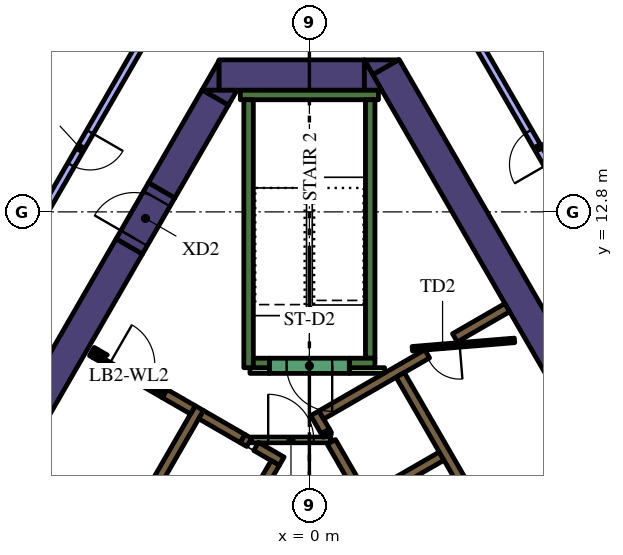
"""IFC4 building model, lengths in metres.
Left out: names, types, materials, properties, quantities, classifications, styles, units other than length and angle.
Written with IfcOpenShell. Run it as: python <this file> out.ifc"""

import sys

from ifc_helpers import new_model, si_unit, direction, frame, frame_2d, origin, place, context, subcontext, project, spatial, polyline, rectangle, outline, extrude, element, fill, save


model = new_model("IFC4")
c1 = context("Model", 3, precision=1e-05, world=origin(), true_north=direction((0.0, 1.0)))
c2 = subcontext(c1, "Body", "Model", "MODEL_VIEW")
j1 = project(units=[si_unit("LENGTHUNIT", "METRE"), si_unit("PLANEANGLEUNIT", "RADIAN")], contexts=[c1])
p1 = place(None, origin())
s1 = spatial("IfcSite", under=j1, at=p1, CompositionType="ELEMENT")
p2 = place(p1, origin())
s2 = spatial("IfcBuilding", under=s1, at=p2, CompositionType="ELEMENT")
p3 = place(p2, frame((0.0, 0.0, 162.6)))
s3 = spatial("IfcBuildingStorey", under=s2, at=p3, CompositionType="ELEMENT", Elevation=162.6)
p4 = place(p3, frame((8.279, 5.761, 0.0), z_axis=(0.0, 0.0, 1.0), x_axis=(-0.500010359015, 0.866019422922, 0.0)))
e1 = element("IfcWall", 1, at=p4, inside=s3, PredefinedType="SOLIDWALL", context=c2, shape_type="SweptSolid", body=[
    extrude(rectangle(XDim=12.528, YDim=0.8, at=frame_2d((6.264, 0.0))), origin(), (0.0, 0.0, 1.0), 4.2),
])
p5 = place(p3, origin())
e2 = element("IfcWall", 2, at=p5, inside=s3, PredefinedType="SOLIDWALL", context=c2, shape_type="SweptSolid", body=[
    extrude(outline(polyline([(1.443, 16.8), (2.339, 16.8), (1.667, 16.412), (1.443, 16.8)])), origin(), (0.0, 0.0, 1.0), 4.2),
])
p6 = place(p3, frame((-2.379, 16.4, 0.0), z_axis=(0.0, 0.0, 1.0), x_axis=(1.0, 0.0, 0.0)))
e3 = element("IfcWall", 3, at=p6, inside=s3, PredefinedType="SOLIDWALL", context=c2, shape_type="SweptSolid", body=[
    extrude(rectangle(XDim=3.824, YDim=0.8, at=frame_2d((1.912, 0.0))), origin(), (0.0, 0.0, 1.0), 4.2),
])
e4 = element("IfcWall", 4, at=p5, inside=s3, PredefinedType="SOLIDWALL", context=c2, shape_type="SweptSolid", body=[
    extrude(outline(polyline([(1.905, 16.0), (1.447, 16.0), (1.447, 16.793), (1.905, 16.0)])), origin(), (0.0, 0.0, 1.0), 4.2),
])
e5 = element("IfcWall", 5, at=p5, inside=s3, PredefinedType="SOLIDWALL", context=c2, shape_type="SweptSolid", body=[
    extrude(outline(polyline([(-2.829, 16.0), (-2.381, 16.776), (-2.381, 16.0), (-2.829, 16.0)])), origin(), (0.0, 0.0, 1.0), 4.2),
])
p7 = place(p3, frame((-2.477, 15.81, 0.0), z_axis=(0.0, 0.0, 1.0), x_axis=(-0.499969377405, -0.866043083026, 0.0)))
e6 = element("IfcWall", 6, at=p7, inside=s3, PredefinedType="SOLIDWALL", context=c2, shape_type="SweptSolid", body=[
    extrude(rectangle(XDim=2.824, YDim=0.8, at=frame_2d((1.412, 0.0))), origin(), (0.0, 0.0, 1.0), 4.2),
])
e7 = element("IfcWall", 7, at=p5, inside=s3, PredefinedType="SOLIDWALL", context=c2, shape_type="SweptSolid", body=[
    extrude(outline(polyline([(-1.905, 16.0), (-2.129, 15.612), (-2.801, 16.0), (-1.905, 16.0)])), origin(), (0.0, 0.0, 1.0), 4.2),
])
p8 = place(p3, frame((-12.668, -1.842, 0.0), z_axis=(0.0, 0.0, 1.0), x_axis=(0.500003640647, 0.866023301845, 0.0)))
e8 = element("IfcWall", 8, at=p8, inside=s3, PredefinedType="SOLIDWALL", context=c2, shape_type="SweptSolid", body=[
    extrude(rectangle(XDim=15.858, YDim=0.8, at=frame_2d((7.929, 0.0))), origin(), (0.0, 0.0, 1.0), 4.2),
])
p9 = place(p3, frame((-1.817, 15.875, 0.0), z_axis=(0.0, 0.0, 1.0), x_axis=(1.0, 0.0, 0.0)))
e9 = element("IfcWall", 9, at=p9, inside=s3, PredefinedType="SOLIDWALL", context=c2, shape_type="SweptSolid", body=[
    extrude(rectangle(XDim=3.634, YDim=0.25, at=frame_2d((1.817, 0.0))), origin(), (0.0, 0.0, 1.0), 4.2),
])
p10 = place(p3, frame((1.6, 8.95, 0.0), z_axis=(0.0, 0.0, 1.0), x_axis=(0.0, 1.0, 0.0)))
e10 = element("IfcWall", 10, at=p10, inside=s3, PredefinedType="SOLIDWALL", context=c2, shape_type="SweptSolid", body=[
    extrude(rectangle(XDim=6.8, YDim=0.25, at=frame_2d((3.4, 0.0))), origin(), (0.0, 0.0, 1.0), 4.2),
])
p11 = place(p3, frame((1.05, 8.825, 0.0), z_axis=(0.0, 0.0, 1.0), x_axis=(1.0, 0.0, 0.0)))
e11 = element("IfcWall", 11, at=p11, inside=s3, PredefinedType="SOLIDWALL", context=c2, shape_type="SweptSolid", body=[
    extrude(rectangle(XDim=0.675, YDim=0.25, at=frame_2d((0.337, 0.0))), origin(), (0.0, 0.0, 1.0), 4.2),
])
p12 = place(p3, frame((-1.6, 8.7, 0.0), z_axis=(0.0, 0.0, 1.0), x_axis=(0.0, 1.0, 0.0)))
e12 = element("IfcWall", 12, at=p12, inside=s3, PredefinedType="SOLIDWALL", context=c2, shape_type="SweptSolid", body=[
    extrude(rectangle(XDim=7.05, YDim=0.25, at=frame_2d((3.525, 0.0))), origin(), (0.0, 0.0, 1.0), 4.2),
])
p13 = place(p3, frame((-1.475, 8.825, 0.0), z_axis=(0.0, 0.0, 1.0), x_axis=(1.0, 0.0, 0.0)))
e13 = element("IfcWall", 13, at=p13, inside=s3, PredefinedType="SOLIDWALL", context=c2, shape_type="SweptSolid", body=[
    extrude(rectangle(XDim=0.425, YDim=0.25, at=frame_2d((0.212, 0.0))), origin(), (0.0, 0.0, 1.0), 4.2),
])
p14 = place(p3, frame((0.473, 6.93, 0.0), z_axis=(0.0, 0.0, 1.0), x_axis=(-0.49972245349, 0.866185586049, 0.0)))
e14 = element("IfcWall", 14, at=p14, inside=s3, PredefinedType="SOLIDWALL", context=c2, shape_type="SweptSolid", body=[
    extrude(rectangle(XDim=0.11, YDim=0.25, at=frame_2d((0.055, 0.0))), origin(), (0.0, 0.0, 1.0), 4.2),
])
p15 = place(p3, frame((6.568, -3.627, 0.0), z_axis=(0.0, 0.0, 1.0), x_axis=(-0.499999455981, 0.866025717874, 0.0)))
e15 = element("IfcWall", 15, at=p15, inside=s3, PredefinedType="SOLIDWALL", context=c2, shape_type="SweptSolid", body=[
    extrude(rectangle(XDim=11.978, YDim=0.25, at=frame_2d((5.989, 0.0))), origin(), (0.0, 0.0, 1.0), 4.2),
])
p16 = place(p3, frame((0.417, 7.027, 0.0), z_axis=(0.0, 0.0, 1.0), x_axis=(-0.500210807569, 0.865903659763, 0.0)))
e16 = element("IfcWall", 16, at=p16, inside=s3, PredefinedType="SOLIDWALL", context=c2, shape_type="SweptSolid", body=[
    extrude(rectangle(XDim=0.548, YDim=0.25, at=frame_2d((0.274, 0.0))), origin(), (0.0, 0.0, 1.0), 4.2),
])
p17 = place(p3, frame((3.1, 9.064, 0.0), z_axis=(0.0, 0.0, 1.0), x_axis=(-0.866030133475, -0.499991807846, 0.0)))
e17 = element("IfcWall", 17, at=p17, inside=s3, PredefinedType="SOLIDWALL", context=c2, shape_type="SweptSolid", body=[
    extrude(rectangle(XDim=3.217, YDim=0.25, at=frame_2d((1.608, 0.0))), origin(), (0.0, 0.0, 1.0), 4.2),
])
p18 = place(p3, frame((1.574, 5.274, 0.0), z_axis=(0.0, 0.0, 1.0), x_axis=(0.866028486751, 0.499994660107, 0.0)))
e18 = element("IfcWall", 18, at=p18, inside=s3, PredefinedType="SOLIDWALL", context=c2, shape_type="SweptSolid", body=[
    extrude(rectangle(XDim=2.2, YDim=0.25, at=frame_2d((1.1, 0.0))), origin(), (0.0, 0.0, 1.0), 4.2),
])
p19 = place(p3, frame((3.83, 9.486, 0.0), z_axis=(0.0, 0.0, 1.0), x_axis=(0.865986202621, 0.500067892261, 0.0)))
e19 = element("IfcWall", 19, at=p19, inside=s3, PredefinedType="SOLIDWALL", context=c2, shape_type="SweptSolid", body=[
    extrude(rectangle(XDim=1.591, YDim=0.25, at=frame_2d((0.795, 0.0))), origin(), (0.0, 0.0, 1.0), 4.2),
])
p20 = place(p3, frame((-8.06, -1.311, 0.0), z_axis=(0.0, 0.0, 1.0), x_axis=(0.50000273126, 0.866023826885, 0.0)))
e20 = element("IfcWall", 20, at=p20, inside=s3, PredefinedType="SOLIDWALL", context=c2, shape_type="SweptSolid", body=[
    extrude(rectangle(XDim=10.33, YDim=0.25, at=frame_2d((5.165, 0.0))), origin(), (0.0, 0.0, 1.0), 4.2),
])
p21 = place(p3, frame((-1.758, 6.835, 0.0), z_axis=(0.0, 0.0, 1.0), x_axis=(0.865982457891, -0.500074377092, 0.0)))
e21 = element("IfcWall", 21, at=p21, inside=s3, PredefinedType="SOLIDWALL", context=c2, shape_type="SweptSolid", body=[
    extrude(rectangle(XDim=0.2, YDim=0.25, at=frame_2d((0.1, 0.0))), origin(), (0.0, 0.0, 1.0), 4.2),
])
p22 = place(p3, frame((-1.76, 6.836, 0.0), z_axis=(0.0, 0.0, 1.0), x_axis=(-0.865952863304, 0.500125622755, 0.0)))
e22 = element("IfcWall", 22, at=p22, inside=s3, PredefinedType="SOLIDWALL", context=c2, shape_type="SweptSolid", body=[
    extrude(rectangle(XDim=1.258, YDim=0.25, at=frame_2d((0.629, 0.0))), origin(), (0.0, 0.0, 1.0), 4.2),
])
p23 = place(p3, frame((-0.728, 6.24, 0.0), z_axis=(0.0, 0.0, 1.0), x_axis=(-0.865955664968, 0.500120771724, 0.0)))
e23 = element("IfcWall", 23, at=p23, inside=s3, PredefinedType="SOLIDWALL", context=c2, shape_type="SweptSolid", body=[
    extrude(rectangle(XDim=0.778, YDim=0.25, at=frame_2d((0.389, 0.0))), origin(), (0.0, 0.0, 1.0), 4.2),
])
p24 = place(p3, frame((-5.725, 9.125, 0.0), z_axis=(0.0, 0.0, 1.0), x_axis=(0.866185586049, -0.49972245349, 0.0)))
e24 = element("IfcWall", 24, at=p24, inside=s3, PredefinedType="SOLIDWALL", context=c2, shape_type="SweptSolid", body=[
    extrude(rectangle(XDim=0.11, YDim=0.25, at=frame_2d((0.055, 0.0))), origin(), (0.0, 0.0, 1.0), 4.2),
])
p25 = place(p3, frame((-3.066, 7.59, 0.0), z_axis=(0.0, 0.0, 1.0), x_axis=(-0.866081358704, 0.49990307071, 0.0)))
e25 = element("IfcWall", 25, at=p25, inside=s3, PredefinedType="SOLIDWALL", context=c2, shape_type="SweptSolid", body=[
    extrude(rectangle(XDim=0.858, YDim=0.25, at=frame_2d((0.429, 0.0))), origin(), (0.0, 0.0, 1.0), 4.2),
])
e26 = element("IfcWall", 26, at=p5, inside=s3, PredefinedType="SOLIDWALL", context=c2, shape_type="SweptSolid", body=[
    extrude(outline(polyline([(-3.748, 8.128), (-3.813, 8.015), (-4.027, 8.139), (-4.017, 8.156), (-4.008, 8.173), (-4.0, 8.192), (-3.995, 8.21), (-3.991, 8.23), (-3.99, 8.25), (-3.99, 8.268), (-3.748, 8.128)])), origin(), (0.0, 0.0, 1.0), 4.2),
])
e27 = element("IfcWall", 27, at=p5, inside=s3, PredefinedType="SOLIDWALL", context=c2, shape_type="SweptSolid", body=[
    extrude(outline(polyline([(-5.689, 8.96), (-5.69, 8.961), (-5.565, 9.177), (-5.319, 9.035), (-5.335, 9.026), (-5.351, 9.015), (-5.366, 9.002), (-5.379, 8.988), (-5.392, 8.972), (-5.402, 8.956), (-5.412, 8.939), (-5.629, 9.064), (-5.629, 9.064), (-5.689, 8.96)])), origin(), (0.0, 0.0, 1.0), 4.2),
])
p26 = place(p3, frame((1.05, 8.625, 0.0), z_axis=(0.0, 0.0, 1.0), x_axis=(1.0, 0.0, 0.0)))
e28 = element("IfcWall", 28, at=p26, inside=s3, PredefinedType="PARTITIONING", context=c2, shape_type="SweptSolid", body=[
    extrude(rectangle(XDim=0.929, YDim=0.15, at=frame_2d((0.464, 0.0))), origin(), (0.0, 0.0, 1.0), 3.15),
])
p27 = place(p3, frame((-1.564, 8.625, 0.0), z_axis=(0.0, 0.0, 1.0), x_axis=(1.0, 0.0, 0.0)))
e29 = element("IfcWall", 29, at=p27, inside=s3, PredefinedType="PARTITIONING", context=c2, shape_type="SweptSolid", body=[
    extrude(rectangle(XDim=0.514, YDim=0.15, at=frame_2d((0.257, 0.0))), origin(), (0.0, 0.0, 1.0), 3.15),
])
p28 = place(p3, frame((8.565, -2.185, 0.0), z_axis=(0.0, 0.0, 1.0), x_axis=(-0.499997954832, 0.866026584559, 0.0)))
e30 = element("IfcWall", 30, at=p28, inside=s3, PredefinedType="SOLIDWALL", context=c2, shape_type="SweptSolid", body=[
    extrude(rectangle(XDim=12.35, YDim=0.25, at=frame_2d((6.175, 0.0))), origin(), (0.0, 0.0, 1.0), 4.2),
])
p29 = place(p28, frame((0.585, 0.0, 0.0)))
e31 = element("IfcOpeningElement", 31, at=p29, cuts=e30, PredefinedType="OPENING", context=c2, shape_type="SweptSolid", body=[
    extrude(rectangle(XDim=1.1, YDim=2.1, at=frame_2d((0.55, 1.05))), frame((0.0, 0.135, 0.0), z_axis=(0.0, -1.0, 0.0), x_axis=(1.0, 0.0, 0.0)), (0.0, 0.0, 1.0), 0.27),
])
p30 = place(p3, frame((-0.898, 6.194, 0.0), z_axis=(0.0, 0.0, 1.0), x_axis=(-0.499996202215, -0.866027596426, 0.0)))
e32 = element("IfcWall", 32, at=p30, inside=s3, PredefinedType="SOLIDWALL", context=c2, shape_type="SweptSolid", body=[
    extrude(rectangle(XDim=9.83, YDim=0.25, at=frame_2d((4.915, 0.0))), origin(), (0.0, 0.0, 1.0), 4.2),
])
p31 = place(p30, frame((0.585, 0.0, 0.0)))
e33 = element("IfcOpeningElement", 33, at=p31, cuts=e32, PredefinedType="OPENING", context=c2, shape_type="SweptSolid", body=[
    extrude(rectangle(XDim=1.1, YDim=2.1, at=frame_2d((0.55, 1.05))), frame((0.0, 0.135, 0.0), z_axis=(0.0, -1.0, 0.0), x_axis=(1.0, 0.0, 0.0)), (0.0, 0.0, 1.0), 0.27),
])
p32 = place(p30, frame((3.105, 0.0, 0.0)))
e34 = element("IfcOpeningElement", 34, at=p32, cuts=e32, PredefinedType="OPENING", context=c2, shape_type="SweptSolid", body=[
    extrude(rectangle(XDim=1.1, YDim=2.1, at=frame_2d((0.55, 1.05))), frame((0.0, 0.135, 0.0), z_axis=(0.0, -1.0, 0.0), x_axis=(1.0, 0.0, 0.0)), (0.0, 0.0, 1.0), 0.27),
])
p33 = place(p30, frame((5.625, 0.0, 0.0)))
e35 = element("IfcOpeningElement", 35, at=p33, cuts=e32, PredefinedType="OPENING", context=c2, shape_type="SweptSolid", body=[
    extrude(rectangle(XDim=1.1, YDim=2.1, at=frame_2d((0.55, 1.05))), frame((0.0, 0.135, 0.0), z_axis=(0.0, -1.0, 0.0), x_axis=(1.0, 0.0, 0.0)), (0.0, 0.0, 1.0), 0.27),
])
p34 = place(p30, frame((8.145, 0.0, 0.0)))
e36 = element("IfcOpeningElement", 36, at=p34, cuts=e32, PredefinedType="OPENING", context=c2, shape_type="SweptSolid", body=[
    extrude(rectangle(XDim=1.1, YDim=2.1, at=frame_2d((0.55, 1.05))), frame((0.0, 0.135, 0.0), z_axis=(0.0, -1.0, 0.0), x_axis=(1.0, 0.0, 0.0)), (0.0, 0.0, 1.0), 0.27),
])
p35 = place(p3, frame((1.05, 8.75, 0.0), z_axis=(0.0, 0.0, 1.0), x_axis=(-1.0, 0.0, 0.0)))
e37 = element("IfcWall", 37, at=p35, inside=s3, PredefinedType="SOLIDWALL", context=c2, shape_type="SweptSolid", body=[
    extrude(rectangle(XDim=2.1, YDim=0.4, at=frame_2d((1.05, 0.0))), origin(), (0.0, 0.0, 1.0), 4.2),
])
p36 = place(p35, frame((0.45, 0.0, 0.0)))
e38 = element("IfcOpeningElement", 38, at=p36, cuts=e37, PredefinedType="OPENING", context=c2, shape_type="SweptSolid", body=[
    extrude(rectangle(XDim=1.2, YDim=2.1, at=frame_2d((0.6, 1.05))), frame((0.0, 0.21, 0.0), z_axis=(0.0, -1.0, 0.0), x_axis=(1.0, 0.0, 0.0)), (0.0, 0.0, 1.0), 0.42),
])
p37 = place(p3, frame((5.398, 9.419, 0.0), z_axis=(0.0, 0.0, 1.0), x_axis=(-0.996653416376, -0.081743303248, 0.0)))
e39 = element("IfcWall", 39, at=p37, inside=s3, PredefinedType="PARTITIONING", context=c2, shape_type="SweptSolid", body=[
    extrude(rectangle(XDim=2.7, YDim=0.12, at=frame_2d((1.35, 0.0))), origin(), (0.0, 0.0, 1.0), 3.15),
])
p38 = place(p37, frame((1.45, 0.0, 0.0)))
e40 = element("IfcOpeningElement", 40, at=p38, cuts=e39, PredefinedType="OPENING", context=c2, shape_type="SweptSolid", body=[
    extrude(rectangle(XDim=0.9, YDim=2.1, at=frame_2d((0.45, 1.05))), frame((0.0, 0.07, 0.0), z_axis=(0.0, -1.0, 0.0), x_axis=(1.0, 0.0, 0.0)), (0.0, 0.0, 1.0), 0.14),
])
p39 = place(p3, frame((-1.534, 6.8, 0.0), z_axis=(0.0, 0.0, 1.0), x_axis=(1.0, 0.0, 0.0)))
e41 = element("IfcWall", 41, at=p39, inside=s3, PredefinedType="PARTITIONING", context=c2, shape_type="SweptSolid", body=[
    extrude(rectangle(XDim=2.1, YDim=0.15, at=frame_2d((1.05, 0.0))), origin(), (0.0, 0.0, 1.0), 3.15),
])
p40 = place(p39, frame((0.45, 0.0, 0.0)))
e42 = element("IfcOpeningElement", 42, at=p40, cuts=e41, PredefinedType="OPENING", context=c2, shape_type="SweptSolid", body=[
    extrude(rectangle(XDim=1.2, YDim=2.1, at=frame_2d((0.6, 1.05))), frame((0.0, 0.085, 0.0), z_axis=(0.0, -1.0, 0.0), x_axis=(1.0, 0.0, 0.0)), (0.0, 0.0, 1.0), 0.17),
])
p41 = place(p3, frame((-5.659, 9.012, 0.0), z_axis=(0.0, 0.0, 1.0), x_axis=(0.866009402589, -0.500027713859, 0.0)))
e43 = element("IfcWall", 43, at=p41, inside=s3, PredefinedType="PARTITIONING", context=c2, shape_type="SweptSolid", body=[
    extrude(rectangle(XDim=2.1, YDim=0.12, at=frame_2d((1.05, 0.0))), origin(), (0.0, 0.0, 1.0), 3.15),
])
p42 = place(p41, frame((0.45, 0.0, 0.0)))
e44 = element("IfcOpeningElement", 44, at=p42, cuts=e43, PredefinedType="OPENING", context=c2, shape_type="SweptSolid", body=[
    extrude(rectangle(XDim=1.2, YDim=2.1, at=frame_2d((0.6, 1.05))), frame((0.0, 0.07, 0.0), z_axis=(0.0, -1.0, 0.0), x_axis=(1.0, 0.0, 0.0)), (0.0, 0.0, 1.0), 0.14),
])
p43 = place(p3, frame((-4.739, 11.892, 0.0), z_axis=(0.0, 0.0, 1.0), x_axis=(0.500062241894, 0.865989465428, 0.0)))
e45 = element("IfcWall", 45, at=p43, inside=s3, PredefinedType="SOLIDWALL", context=c2, shape_type="SweptSolid", body=[
    extrude(rectangle(XDim=1.7, YDim=0.8, at=frame_2d((0.85, 0.0))), origin(), (0.0, 0.0, 1.0), 4.2),
])
p44 = place(p43, frame((0.25, 0.0, 0.0)))
e46 = element("IfcOpeningElement", 46, at=p44, cuts=e45, PredefinedType="OPENING", context=c2, shape_type="SweptSolid", body=[
    extrude(rectangle(XDim=1.2, YDim=2.1, at=frame_2d((0.6, 1.05))), frame((0.0, 0.41, 0.0), z_axis=(0.0, -1.0, 0.0), x_axis=(1.0, 0.0, 0.0)), (0.0, 0.0, 1.0), 0.82),
])
p45 = place(p3, frame((6.013, 21.573, 0.0), z_axis=(0.0, 0.0, 1.0), x_axis=(0.551906048292, -0.833906298009, 0.0)))
e47 = element("IfcWall", 47, at=p45, inside=s3, PredefinedType="PARTITIONING", context=c2, shape_type="SweptSolid", body=[
    extrude(rectangle(XDim=5.995, YDim=0.15, at=frame_2d((2.998, 0.0))), origin(), (0.0, 0.0, 1.0), 3.15),
])
p46 = place(p45, frame((2.595, 0.0, 0.0)))
e48 = element("IfcOpeningElement", 48, at=p46, cuts=e47, PredefinedType="OPENING", context=c2, shape_type="SweptSolid", body=[
    extrude(rectangle(XDim=0.9, YDim=2.1, at=frame_2d((0.45, 1.05))), frame((0.0, 0.085, 0.0), z_axis=(0.0, -1.0, 0.0), x_axis=(1.0, 0.0, 0.0)), (0.0, 0.0, 1.0), 0.17),
])
p47 = place(p3, frame((8.515, 10.152, 0.0), z_axis=(0.0, 0.0, 1.0), x_axis=(-0.499998974385, 0.866025995923, 0.0)))
e49 = element("IfcWall", 49, at=p47, inside=s3, PredefinedType="PARTITIONING", context=c2, shape_type="SweptSolid", body=[
    extrude(rectangle(XDim=9.986, YDim=0.2, at=frame_2d((4.993, 0.0))), origin(), (0.0, 0.0, 1.0), 3.15),
])
p48 = place(p47, frame((4.5, 0.0, 0.0)))
e50 = element("IfcOpeningElement", 50, at=p48, cuts=e49, PredefinedType="OPENING", context=c2, shape_type="SweptSolid", body=[
    extrude(rectangle(XDim=1.0, YDim=2.1, at=frame_2d((0.5, 1.05))), frame((0.0, 0.11, 0.0), z_axis=(0.0, -1.0, 0.0), x_axis=(1.0, 0.0, 0.0)), (0.0, 0.0, 1.0), 0.22),
])
p49 = place(p3, frame((-9.322, 16.573, 0.0), z_axis=(0.0, 0.0, 1.0), x_axis=(0.551906048292, 0.833906298009, 0.0)))
e51 = element("IfcWall", 51, at=p49, inside=s3, PredefinedType="PARTITIONING", context=c2, shape_type="SweptSolid", body=[
    extrude(rectangle(XDim=5.995, YDim=0.15, at=frame_2d((2.998, 0.0))), origin(), (0.0, 0.0, 1.0), 3.15),
])
p50 = place(p49, frame((2.595, 0.0, 0.0)))
e52 = element("IfcOpeningElement", 52, at=p50, cuts=e51, PredefinedType="OPENING", context=c2, shape_type="SweptSolid", body=[
    extrude(rectangle(XDim=0.9, YDim=2.1, at=frame_2d((0.45, 1.05))), frame((0.0, 0.085, 0.0), z_axis=(0.0, -1.0, 0.0), x_axis=(1.0, 0.0, 0.0)), (0.0, 0.0, 1.0), 0.17),
])
p51 = place(p3, frame((-3.522, 18.8, 0.0), z_axis=(0.0, 0.0, 1.0), x_axis=(-0.500015783377, -0.866016291056, 0.0)))
e53 = element("IfcWall", 53, at=p51, inside=s3, PredefinedType="PARTITIONING", context=c2, shape_type="SweptSolid", body=[
    extrude(rectangle(XDim=9.99, YDim=0.2, at=frame_2d((4.995, 0.0))), origin(), (0.0, 0.0, 1.0), 3.15),
])
p52 = place(p51, frame((4.5, 0.0, 0.0)))
e54 = element("IfcOpeningElement", 54, at=p52, cuts=e53, PredefinedType="OPENING", context=c2, shape_type="SweptSolid", body=[
    extrude(rectangle(XDim=1.0, YDim=2.1, at=frame_2d((0.5, 1.05))), frame((0.0, 0.11, 0.0), z_axis=(0.0, -1.0, 0.0), x_axis=(1.0, 0.0, 0.0)), (0.0, 0.0, 1.0), 0.22),
])
p53 = place(p36, origin())
e55 = element("IfcDoor", 55, at=p53, inside=s3, OperationType="SINGLE_SWING_LEFT", PredefinedType="DOOR", context=c2, shape_type="SweptSolid", body=[
    extrude(rectangle(XDim=1.2, YDim=2.1, at=frame_2d((0.6, 1.05))), frame((0.0, 0.025, 0.0), z_axis=(0.0, -1.0, 0.0), x_axis=(1.0, 0.0, 0.0)), (0.0, 0.0, 1.0), 0.05),
])
fill(e38, e55)
p54 = place(p38, origin())
e56 = element("IfcDoor", 56, at=p54, inside=s3, OperationType="SINGLE_SWING_LEFT", PredefinedType="DOOR", context=c2, shape_type="SweptSolid", body=[
    extrude(rectangle(XDim=0.9, YDim=2.1, at=frame_2d((0.45, 1.05))), frame((0.0, 0.025, 0.0), z_axis=(0.0, -1.0, 0.0), x_axis=(1.0, 0.0, 0.0)), (0.0, 0.0, 1.0), 0.05),
])
fill(e40, e56)
p55 = place(p40, origin())
e57 = element("IfcDoor", 57, at=p55, inside=s3, OperationType="SINGLE_SWING_LEFT", PredefinedType="DOOR", context=c2, shape_type="SweptSolid", body=[
    extrude(rectangle(XDim=1.2, YDim=2.1, at=frame_2d((0.6, 1.05))), frame((0.0, 0.025, 0.0), z_axis=(0.0, -1.0, 0.0), x_axis=(1.0, 0.0, 0.0)), (0.0, 0.0, 1.0), 0.05),
])
fill(e42, e57)
p56 = place(p42, origin())
e58 = element("IfcDoor", 58, at=p56, inside=s3, OperationType="SINGLE_SWING_LEFT", PredefinedType="DOOR", context=c2, shape_type="SweptSolid", body=[
    extrude(rectangle(XDim=1.2, YDim=2.1, at=frame_2d((0.6, 1.05))), frame((0.0, 0.025, 0.0), z_axis=(0.0, -1.0, 0.0), x_axis=(1.0, 0.0, 0.0)), (0.0, 0.0, 1.0), 0.05),
])
fill(e44, e58)
p57 = place(p44, origin())
e59 = element("IfcDoor", 59, at=p57, inside=s3, OperationType="SINGLE_SWING_LEFT", PredefinedType="DOOR", context=c2, shape_type="SweptSolid", body=[
    extrude(rectangle(XDim=1.2, YDim=2.1, at=frame_2d((0.6, 1.05))), frame((0.0, 0.025, 0.0), z_axis=(0.0, -1.0, 0.0), x_axis=(1.0, 0.0, 0.0)), (0.0, 0.0, 1.0), 0.05),
])
fill(e46, e59)
p58 = place(p48, origin())
e60 = element("IfcDoor", 60, at=p58, inside=s3, OperationType="SINGLE_SWING_RIGHT", PredefinedType="DOOR", context=c2, shape_type="SweptSolid", body=[
    extrude(rectangle(XDim=1.0, YDim=2.1, at=frame_2d((0.5, 1.05))), frame((0.0, 0.025, 0.0), z_axis=(0.0, -1.0, 0.0), x_axis=(1.0, 0.0, 0.0)), (0.0, 0.0, 1.0), 0.05),
])
fill(e50, e60)
p59 = place(p52, origin())
e61 = element("IfcDoor", 61, at=p59, inside=s3, OperationType="SINGLE_SWING_RIGHT", PredefinedType="DOOR", context=c2, shape_type="SweptSolid", body=[
    extrude(rectangle(XDim=1.0, YDim=2.1, at=frame_2d((0.5, 1.05))), frame((0.0, 0.025, 0.0), z_axis=(0.0, -1.0, 0.0), x_axis=(1.0, 0.0, 0.0)), (0.0, 0.0, 1.0), 0.05),
])
fill(e54, e61)
save(model, sys.argv[1])
